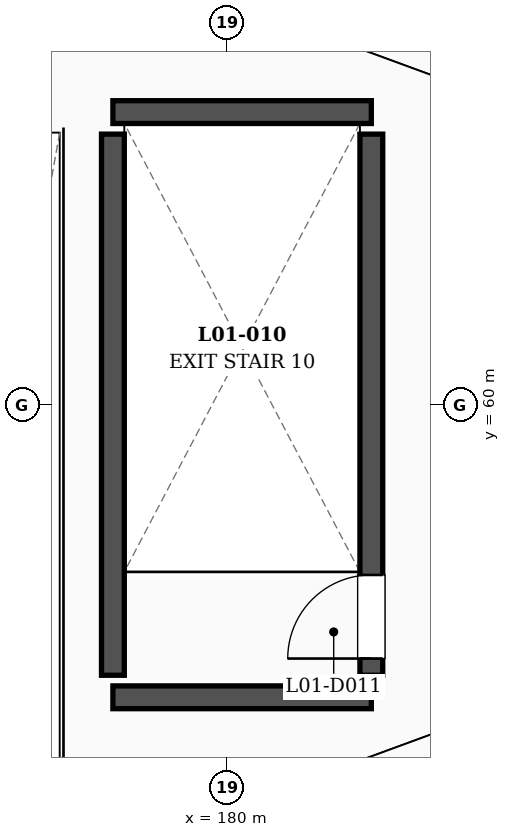
"""IFC4 building model, lengths in metres.
Left out: names, types, materials, properties, quantities, classifications, styles, units other than length and angle.
Written with IfcOpenShell. Run it as: python <this file> out.ifc"""

import sys

from ifc_helpers import new_model, si_unit, direction, frame, frame_2d, origin, place, context, subcontext, project, spatial, rectangle, extrude, element, fill, save


model = new_model("IFC4")
c1 = context("Model", 3, precision=1e-05, world=origin(), true_north=direction((0.0, 1.0)))
c2 = subcontext(c1, "Body", "Model", "MODEL_VIEW")
j1 = project(units=[si_unit("LENGTHUNIT", "METRE"), si_unit("PLANEANGLEUNIT", "RADIAN")], contexts=[c1])
p1 = place(None, origin())
s1 = spatial("IfcSite", under=j1, at=p1, CompositionType="ELEMENT")
p2 = place(p1, origin())
s2 = spatial("IfcBuilding", under=s1, at=p2, CompositionType="ELEMENT")
p3 = place(p2, frame((0.0, 0.0, 6.0)))
s3 = spatial("IfcBuildingStorey", under=s2, at=p3, CompositionType="ELEMENT", Elevation=6.0)
for number, where, z_axis, x_axis in (
    (1, (178.5, 56.15, 0.0), (0.0, 0.0, 1.0), (1.0, 0.0, 0.0)),
    (2, (178.5, 63.85, 0.0), (0.0, 0.0, 1.0), (1.0, 0.0, 0.0)),
):
    element("IfcWall", number, at=place(p3, frame(where, z_axis=z_axis, x_axis=x_axis)), inside=s3, PredefinedType="SHEAR", context=c2, shape_type="SweptSolid", body=[
        extrude(rectangle(XDim=3.4, YDim=0.3, at=frame_2d((1.7, 0.0))), origin(), (0.0, 0.0, 1.0), 4.8),
    ])
p4 = place(p3, frame((178.5, 56.44, 0.0), z_axis=(0.0, 0.0, 1.0), x_axis=(0.0, 1.0, 0.0)))
e3 = element("IfcWall", 3, at=p4, inside=s3, PredefinedType="SHEAR", context=c2, shape_type="SweptSolid", body=[
    extrude(rectangle(XDim=7.12, YDim=0.3, at=frame_2d((3.56, 0.0))), origin(), (0.0, 0.0, 1.0), 4.8),
])
p5 = place(p3, frame((181.9, 56.44, 0.0), z_axis=(0.0, 0.0, 1.0), x_axis=(0.0, 1.0, 0.0)))
e4 = element("IfcWall", 4, at=p5, inside=s3, PredefinedType="SHEAR", context=c2, shape_type="SweptSolid", body=[
    extrude(rectangle(XDim=7.12, YDim=0.3, at=frame_2d((3.56, 0.0))), origin(), (0.0, 0.0, 1.0), 4.8),
])
p6 = place(p5, frame((0.22, 0.0, 0.0)))
e5 = element("IfcOpeningElement", 5, at=p6, cuts=e4, PredefinedType="OPENING", context=c2, shape_type="SweptSolid", body=[
    extrude(rectangle(XDim=1.1, YDim=2.2, at=frame_2d((0.55, 1.1))), frame((0.0, 0.16, 0.0), z_axis=(0.0, -1.0, 0.0), x_axis=(1.0, 0.0, 0.0)), (0.0, 0.0, 1.0), 0.32),
])
p7 = place(p6, origin())
e6 = element("IfcDoor", 6, at=p7, inside=s3, OperationType="SINGLE_SWING_LEFT", PredefinedType="DOOR", context=c2, shape_type="SweptSolid", body=[
    extrude(rectangle(XDim=1.1, YDim=2.2, at=frame_2d((0.55, 1.1))), frame((0.0, 0.025, 0.0), z_axis=(0.0, -1.0, 0.0), x_axis=(1.0, 0.0, 0.0)), (0.0, 0.0, 1.0), 0.05),
])
fill(e5, e6)
save(model, sys.argv[1])
